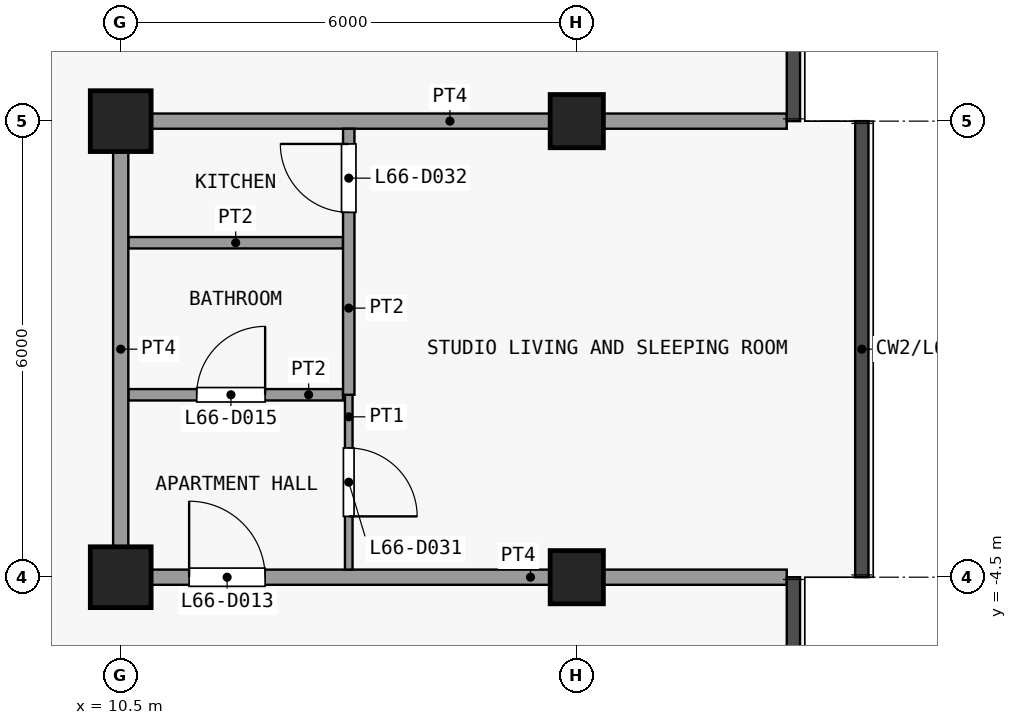
"""IFC4 building model, lengths in metres.
Left out: names, types, materials, properties, quantities, classifications, styles, units other than length and angle.
Written with IfcOpenShell. Run it as: python <this file> out.ifc"""

import sys

from ifc_helpers import new_model, si_unit, direction, frame, frame_2d, origin, origin_2d, place, context, subcontext, project, spatial, rectangle, extrude, element, fill, save


model = new_model("IFC4")
c1 = context("Model", 3, precision=1e-05, world=origin(), true_north=direction((0.0, 1.0)))
c2 = subcontext(c1, "Body", "Model", "MODEL_VIEW")
j1 = project(units=[si_unit("LENGTHUNIT", "METRE"), si_unit("PLANEANGLEUNIT", "RADIAN")], contexts=[c1])
p1 = place(None, origin())
s1 = spatial("IfcSite", under=j1, at=p1, CompositionType="ELEMENT")
p2 = place(p1, origin())
s2 = spatial("IfcBuilding", under=s1, at=p2, CompositionType="ELEMENT")
p3 = place(p2, frame((0.0, 0.0, 262.7)))
s3 = spatial("IfcBuildingStorey", under=s2, at=p3, CompositionType="ELEMENT", Elevation=262.7)
for number, where, z_axis, x_axis in (
    (1, (10.5, -4.5, 0.0), (0.0, 0.0, 1.0), (1.0, 0.0, 0.0)),
    (2, (10.5, 1.5, 0.0), (0.0, 0.0, 1.0), (1.0, 0.0, 0.0)),
):
    element("IfcColumn", number, at=place(p3, frame(where, z_axis=z_axis, x_axis=x_axis)), inside=s3, PredefinedType="COLUMN", context=c2, shape_type="SweptSolid", body=[
        extrude(rectangle(XDim=0.8, YDim=0.8, at=origin_2d()), origin(), (0.0, 0.0, 1.0), 3.6),
    ])
for number, where, z_axis, x_axis in (
    (3, (16.5, -4.5, 0.0), (0.0, 0.0, 1.0), (1.0, 0.0, 0.0)),
    (4, (16.5, 1.5, 0.0), (0.0, 0.0, 1.0), (1.0, 0.0, 0.0)),
):
    element("IfcColumn", number, at=place(p3, frame(where, z_axis=z_axis, x_axis=x_axis)), inside=s3, PredefinedType="COLUMN", context=c2, shape_type="SweptSolid", body=[
        extrude(rectangle(XDim=0.7, YDim=0.7, at=origin_2d()), origin(), (0.0, 0.0, 1.0), 3.6),
    ])
p4 = place(p3, frame((10.4, -4.5, 0.0), z_axis=(0.0, 0.0, 1.0), x_axis=(1.0, 0.0, 0.0)))
e5 = element("IfcWall", 5, at=p4, inside=s3, PredefinedType="PARTITIONING", context=c2, shape_type="SweptSolid", body=[
    extrude(rectangle(XDim=8.863, YDim=0.2, at=frame_2d((4.431, 0.0))), origin(), (0.0, 0.0, 1.0), 3.3),
])
p5 = place(p4, frame((1.0, 0.0, 0.0)))
e6 = element("IfcOpeningElement", 6, at=p5, cuts=e5, PredefinedType="OPENING", context=c2, shape_type="SweptSolid", body=[
    extrude(rectangle(XDim=1.0, YDim=2.1, at=frame_2d((0.5, 1.05))), frame((0.0, 0.11, 0.0), z_axis=(0.0, -1.0, 0.0), x_axis=(1.0, 0.0, 0.0)), (0.0, 0.0, 1.0), 0.22),
])
p6 = place(p3, frame((10.6, -2.1, 0.0), z_axis=(0.0, 0.0, 1.0), x_axis=(1.0, 0.0, 0.0)))
e7 = element("IfcWall", 7, at=p6, inside=s3, PredefinedType="PARTITIONING", context=c2, shape_type="SweptSolid", body=[
    extrude(rectangle(XDim=2.825, YDim=0.15, at=frame_2d((1.413, 0.0))), origin(), (0.0, 0.0, 1.0), 3.3),
])
p7 = place(p6, frame((0.9, 0.0, 0.0)))
e8 = element("IfcOpeningElement", 8, at=p7, cuts=e7, PredefinedType="OPENING", context=c2, shape_type="SweptSolid", body=[
    extrude(rectangle(XDim=0.9, YDim=2.1, at=frame_2d((0.45, 1.05))), frame((0.0, 0.085, 0.0), z_axis=(0.0, -1.0, 0.0), x_axis=(1.0, 0.0, 0.0)), (0.0, 0.0, 1.0), 0.17),
])
p8 = place(p3, frame((10.6, -0.1, 0.0), z_axis=(0.0, 0.0, 1.0), x_axis=(1.0, 0.0, 0.0)))
e9 = element("IfcWall", 9, at=p8, inside=s3, PredefinedType="PARTITIONING", context=c2, shape_type="SweptSolid", body=[
    extrude(rectangle(XDim=2.825, YDim=0.15, at=frame_2d((1.413, 0.0))), origin(), (0.0, 0.0, 1.0), 3.3),
])
p9 = place(p3, frame((10.4, 1.5, 0.0), z_axis=(0.0, 0.0, 1.0), x_axis=(1.0, 0.0, 0.0)))
e10 = element("IfcWall", 10, at=p9, inside=s3, PredefinedType="PARTITIONING", context=c2, shape_type="SweptSolid", body=[
    extrude(rectangle(XDim=8.863, YDim=0.2, at=frame_2d((4.431, 0.0))), origin(), (0.0, 0.0, 1.0), 3.3),
])
p10 = place(p3, frame((10.5, -4.4, 0.0), z_axis=(0.0, 0.0, 1.0), x_axis=(0.0, 1.0, 0.0)))
e11 = element("IfcWall", 11, at=p10, inside=s3, PredefinedType="PARTITIONING", context=c2, shape_type="SweptSolid", body=[
    extrude(rectangle(XDim=5.8, YDim=0.2, at=frame_2d((2.9, 0.0))), origin(), (0.0, 0.0, 1.0), 3.3),
])
p11 = place(p3, frame((13.5, -4.4, 0.0), z_axis=(0.0, 0.0, 1.0), x_axis=(0.0, 1.0, 0.0)))
e12 = element("IfcWall", 12, at=p11, inside=s3, PredefinedType="PARTITIONING", context=c2, shape_type="SweptSolid", body=[
    extrude(rectangle(XDim=2.3, YDim=0.1, at=frame_2d((1.15, 0.0))), origin(), (0.0, 0.0, 1.0), 3.3),
])
p12 = place(p11, frame((0.7, 0.0, 0.0)))
e13 = element("IfcOpeningElement", 13, at=p12, cuts=e12, PredefinedType="OPENING", context=c2, shape_type="SweptSolid", body=[
    extrude(rectangle(XDim=0.9, YDim=2.1, at=frame_2d((0.45, 1.05))), frame((0.0, 0.06, 0.0), z_axis=(0.0, -1.0, 0.0), x_axis=(1.0, 0.0, 0.0)), (0.0, 0.0, 1.0), 0.12),
])
p13 = place(p3, frame((13.5, -2.1, 0.0), z_axis=(0.0, 0.0, 1.0), x_axis=(0.0, 1.0, 0.0)))
e14 = element("IfcWall", 14, at=p13, inside=s3, PredefinedType="PARTITIONING", context=c2, shape_type="SweptSolid", body=[
    extrude(rectangle(XDim=3.5, YDim=0.15, at=frame_2d((1.75, 0.0))), origin(), (0.0, 0.0, 1.0), 3.3),
])
p14 = place(p13, frame((2.4, 0.0, 0.0)))
e15 = element("IfcOpeningElement", 15, at=p14, cuts=e14, PredefinedType="OPENING", context=c2, shape_type="SweptSolid", body=[
    extrude(rectangle(XDim=0.9, YDim=2.1, at=frame_2d((0.45, 1.05))), frame((0.0, 0.085, 0.0), z_axis=(0.0, -1.0, 0.0), x_axis=(1.0, 0.0, 0.0)), (0.0, 0.0, 1.0), 0.17),
])
p15 = place(p5, origin())
e16 = element("IfcDoor", 16, at=p15, inside=s3, OperationType="SINGLE_SWING_RIGHT", PredefinedType="DOOR", context=c2, shape_type="SweptSolid", body=[
    extrude(rectangle(XDim=1.0, YDim=2.1, at=frame_2d((0.5, 1.05))), frame((0.0, 0.025, 0.0), z_axis=(0.0, -1.0, 0.0), x_axis=(1.0, 0.0, 0.0)), (0.0, 0.0, 1.0), 0.05),
])
fill(e6, e16)
p16 = place(p7, origin())
e17 = element("IfcDoor", 17, at=p16, inside=s3, OperationType="SINGLE_SWING_LEFT", PredefinedType="DOOR", context=c2, shape_type="SweptSolid", body=[
    extrude(rectangle(XDim=0.9, YDim=2.1, at=frame_2d((0.45, 1.05))), frame((0.0, 0.025, 0.0), z_axis=(0.0, -1.0, 0.0), x_axis=(1.0, 0.0, 0.0)), (0.0, 0.0, 1.0), 0.05),
])
fill(e8, e17)
p17 = place(p12, origin())
e18 = element("IfcDoor", 18, at=p17, inside=s3, OperationType="SINGLE_SWING_LEFT", PredefinedType="DOOR", context=c2, shape_type="SweptSolid", body=[
    extrude(rectangle(XDim=0.9, YDim=2.1, at=frame_2d((0.45, 1.05))), frame((0.0, 0.025, 0.0), z_axis=(0.0, -1.0, 0.0), x_axis=(1.0, 0.0, 0.0)), (0.0, 0.0, 1.0), 0.05),
])
fill(e13, e18)
p18 = place(p14, origin())
e19 = element("IfcDoor", 19, at=p18, inside=s3, OperationType="SINGLE_SWING_LEFT", PredefinedType="DOOR", context=c2, shape_type="SweptSolid", body=[
    extrude(rectangle(XDim=0.9, YDim=2.1, at=frame_2d((0.45, 1.05))), frame((0.0, 0.025, 0.0), z_axis=(0.0, -1.0, 0.0), x_axis=(1.0, 0.0, 0.0)), (0.0, 0.0, 1.0), 0.05),
])
fill(e15, e19)
save(model, sys.argv[1])
